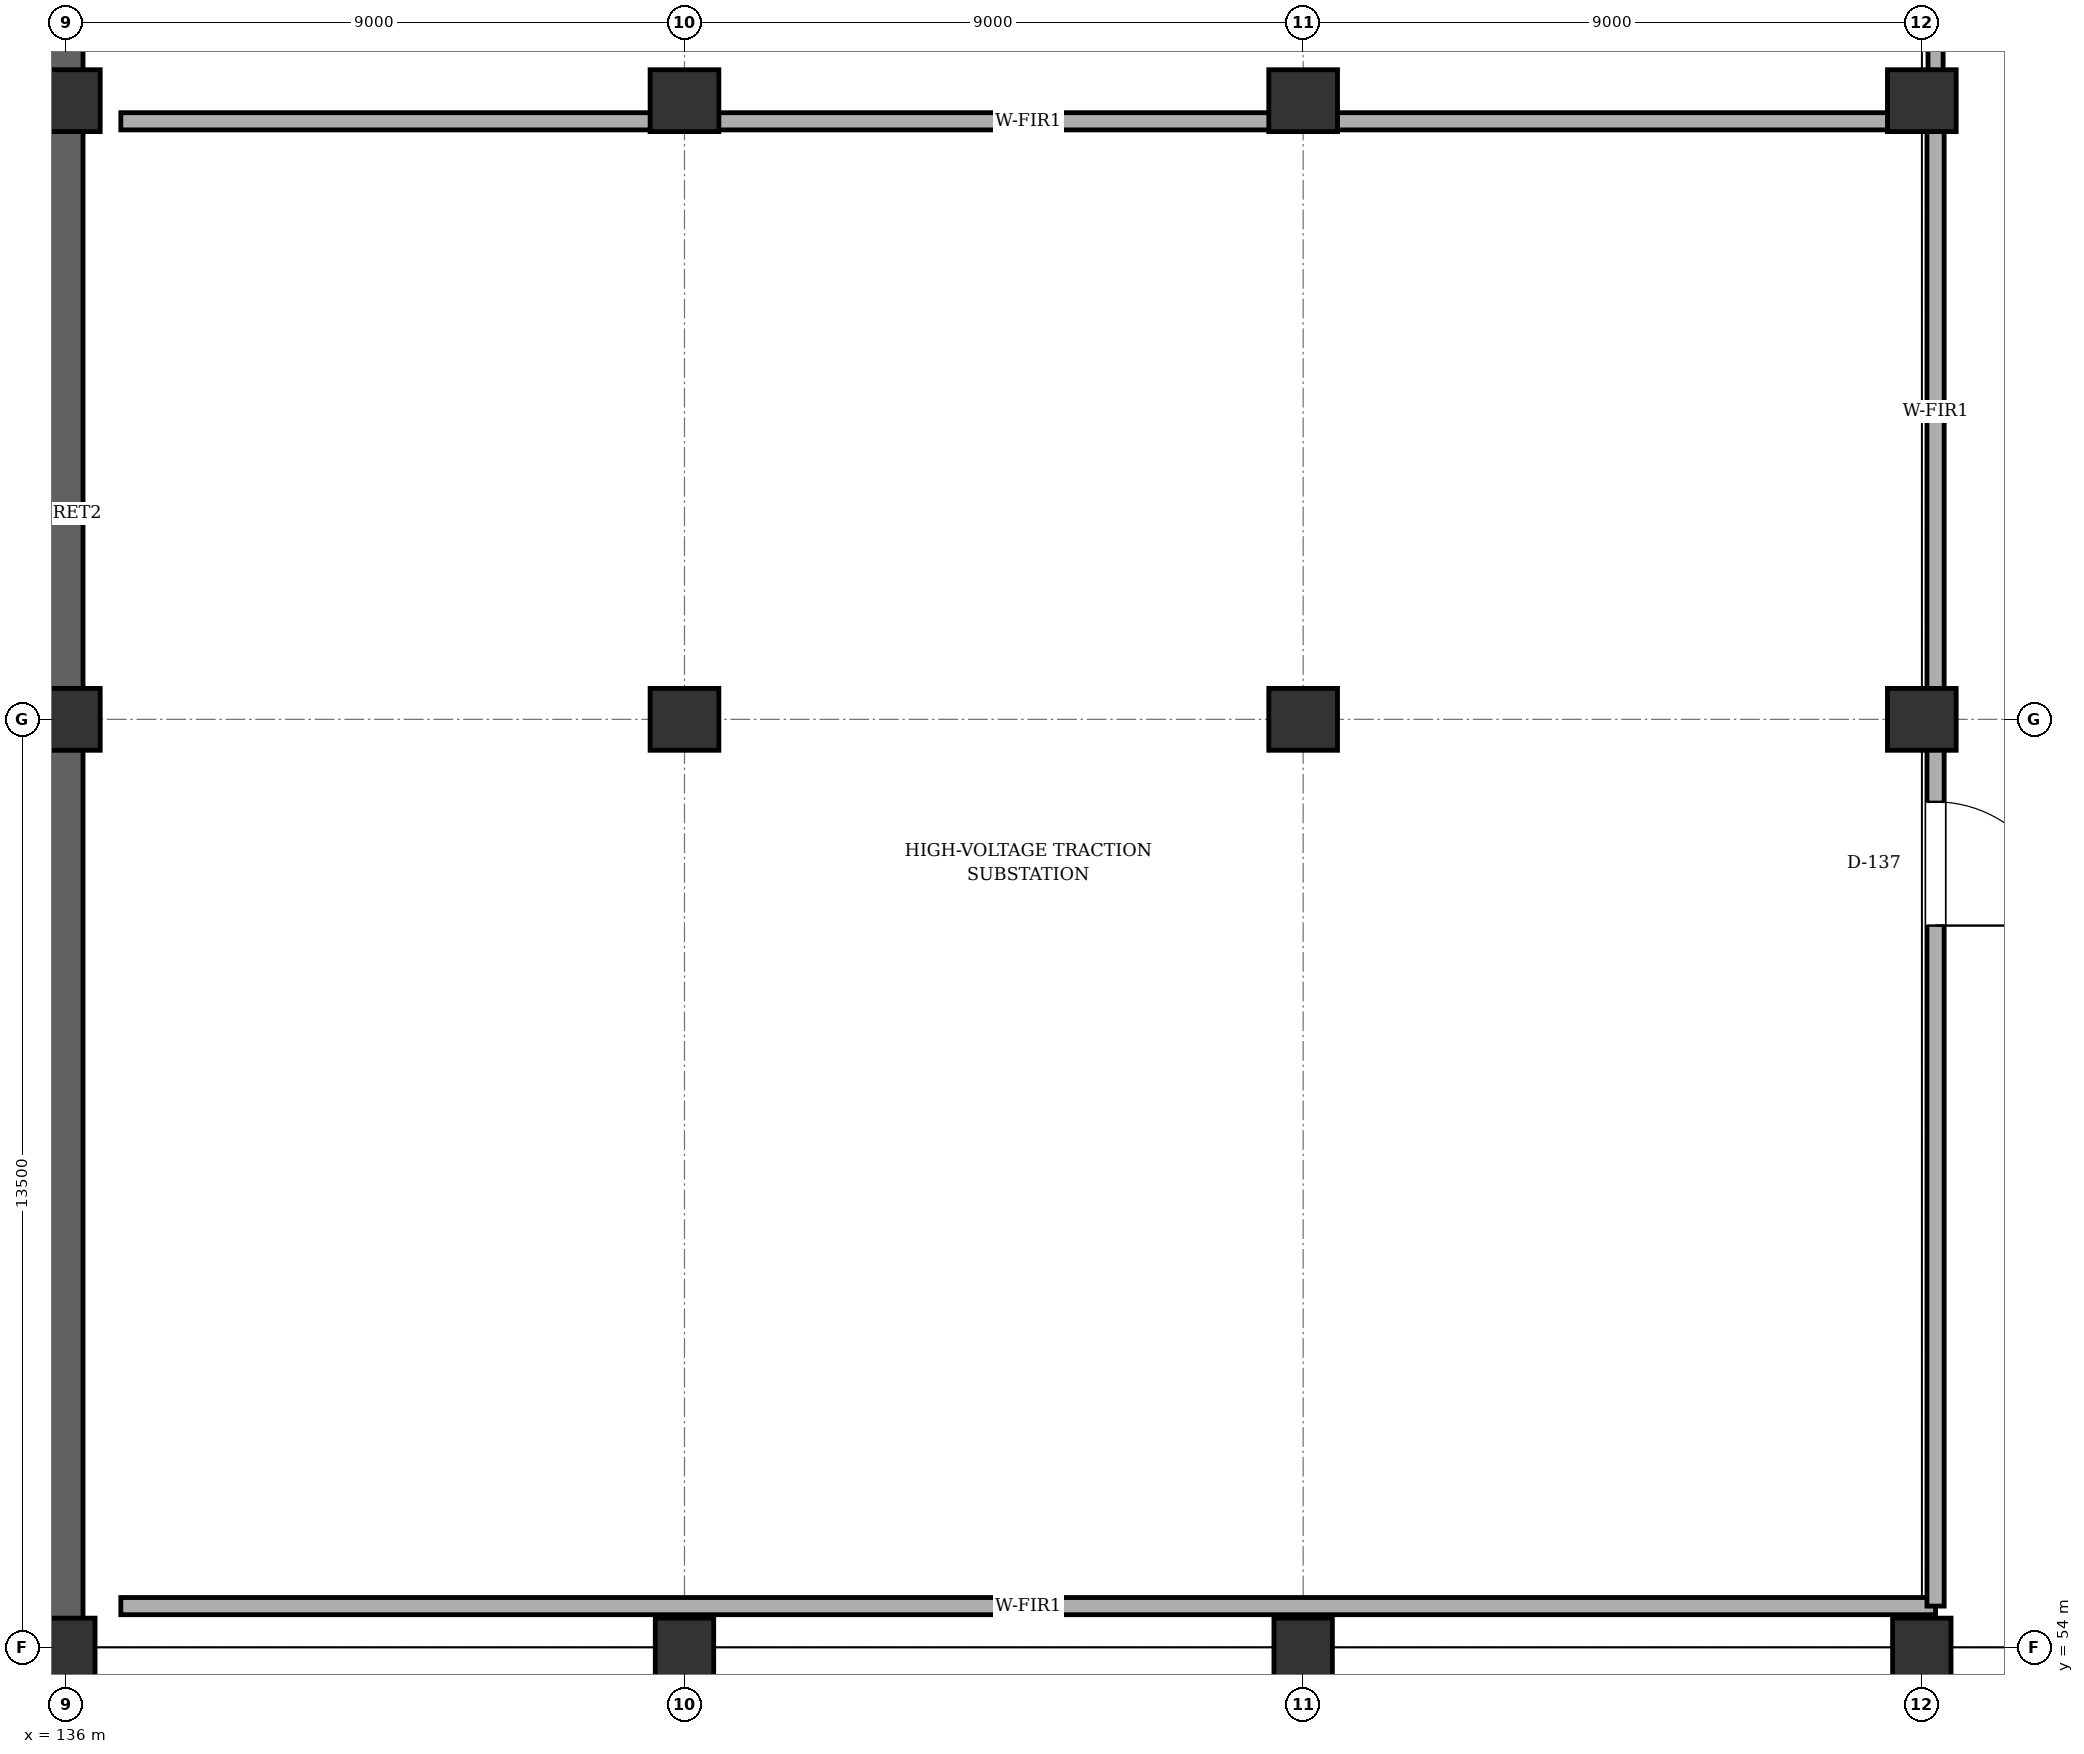
"""IFC4 building model, lengths in metres.
Left out: names, types, materials, properties, quantities, classifications, styles, units other than length and angle.
Written with IfcOpenShell. Run it as: python <this file> out.ifc"""

import sys

from ifc_helpers import new_model, si_unit, direction, frame, frame_2d, origin, origin_2d, place, context, subcontext, project, spatial, rectangle, extrude, element, fill, save


model = new_model("IFC4")
c1 = context("Model", 3, precision=1e-05, world=origin(), true_north=direction((0.0, 1.0)))
c2 = subcontext(c1, "Body", "Model", "MODEL_VIEW")
j1 = project(units=[si_unit("LENGTHUNIT", "METRE"), si_unit("PLANEANGLEUNIT", "RADIAN")], contexts=[c1])
p1 = place(None, origin())
s1 = spatial("IfcSite", under=j1, at=p1, CompositionType="ELEMENT")
p2 = place(p1, origin())
s2 = spatial("IfcBuilding", under=s1, at=p2, CompositionType="ELEMENT")
p3 = place(p2, frame((0.0, 0.0, -5.4)))
s3 = spatial("IfcBuildingStorey", under=s2, at=p3, CompositionType="ELEMENT", Elevation=-5.4)
p4 = place(p3, frame((136.0, 54.0, 0.0), z_axis=(0.0, 0.0, 1.0), x_axis=(1.0, 0.0, 0.0)))
e1 = element("IfcColumn", 1, at=p4, inside=s3, PredefinedType="COLUMN", context=c2, shape_type="SweptSolid", body=[
    extrude(rectangle(XDim=0.85, YDim=0.85, at=origin_2d()), origin(), (0.0, 0.0, 1.0), 5.4),
])
for number, where, z_axis, x_axis in (
    (2, (136.0, 67.5, 0.0), (0.0, 0.0, 1.0), (1.0, 0.0, 0.0)),
    (3, (136.0, 76.5, 0.0), (0.0, 0.0, 1.0), (1.0, 0.0, 0.0)),
):
    element("IfcColumn", number, at=place(p3, frame(where, z_axis=z_axis, x_axis=x_axis)), inside=s3, PredefinedType="COLUMN", context=c2, shape_type="SweptSolid", body=[
        extrude(rectangle(XDim=1.0, YDim=0.9, at=origin_2d()), origin(), (0.0, 0.0, 1.0), 5.4),
    ])
p5 = place(p3, frame((145.0, 54.0, 0.0), z_axis=(0.0, 0.0, 1.0), x_axis=(1.0, 0.0, 0.0)))
e4 = element("IfcColumn", 4, at=p5, inside=s3, PredefinedType="COLUMN", context=c2, shape_type="SweptSolid", body=[
    extrude(rectangle(XDim=0.85, YDim=0.85, at=origin_2d()), origin(), (0.0, 0.0, 1.0), 5.4),
])
for number, where, z_axis, x_axis in (
    (5, (145.0, 67.5, 0.0), (0.0, 0.0, 1.0), (1.0, 0.0, 0.0)),
    (6, (145.0, 76.5, 0.0), (0.0, 0.0, 1.0), (1.0, 0.0, 0.0)),
):
    element("IfcColumn", number, at=place(p3, frame(where, z_axis=z_axis, x_axis=x_axis)), inside=s3, PredefinedType="COLUMN", context=c2, shape_type="SweptSolid", body=[
        extrude(rectangle(XDim=1.0, YDim=0.9, at=origin_2d()), origin(), (0.0, 0.0, 1.0), 5.4),
    ])
p6 = place(p3, frame((154.0, 54.0, 0.0), z_axis=(0.0, 0.0, 1.0), x_axis=(1.0, 0.0, 0.0)))
e7 = element("IfcColumn", 7, at=p6, inside=s3, PredefinedType="COLUMN", context=c2, shape_type="SweptSolid", body=[
    extrude(rectangle(XDim=0.85, YDim=0.85, at=origin_2d()), origin(), (0.0, 0.0, 1.0), 5.4),
])
for number, where, z_axis, x_axis in (
    (8, (154.0, 67.5, 0.0), (0.0, 0.0, 1.0), (1.0, 0.0, 0.0)),
    (9, (154.0, 76.5, 0.0), (0.0, 0.0, 1.0), (1.0, 0.0, 0.0)),
):
    element("IfcColumn", number, at=place(p3, frame(where, z_axis=z_axis, x_axis=x_axis)), inside=s3, PredefinedType="COLUMN", context=c2, shape_type="SweptSolid", body=[
        extrude(rectangle(XDim=1.0, YDim=0.9, at=origin_2d()), origin(), (0.0, 0.0, 1.0), 5.4),
    ])
p7 = place(p3, frame((163.0, 54.0, 0.0), z_axis=(0.0, 0.0, 1.0), x_axis=(1.0, 0.0, 0.0)))
e10 = element("IfcColumn", 10, at=p7, inside=s3, PredefinedType="COLUMN", context=c2, shape_type="SweptSolid", body=[
    extrude(rectangle(XDim=0.85, YDim=0.85, at=origin_2d()), origin(), (0.0, 0.0, 1.0), 5.4),
])
for number, where, z_axis, x_axis in (
    (11, (163.0, 67.5, 0.0), (0.0, 0.0, 1.0), (1.0, 0.0, 0.0)),
    (12, (163.0, 76.5, 0.0), (0.0, 0.0, 1.0), (1.0, 0.0, 0.0)),
):
    element("IfcColumn", number, at=place(p3, frame(where, z_axis=z_axis, x_axis=x_axis)), inside=s3, PredefinedType="COLUMN", context=c2, shape_type="SweptSolid", body=[
        extrude(rectangle(XDim=1.0, YDim=0.9, at=origin_2d()), origin(), (0.0, 0.0, 1.0), 5.4),
    ])
p8 = place(p3, frame((136.0, 126.0, 0.0), z_axis=(0.0, 0.0, 1.0), x_axis=(0.0, -1.0, 0.0)))
e13 = element("IfcWall", 13, at=p8, inside=s3, PredefinedType="USERDEFINED", context=c2, shape_type="SweptSolid", body=[
    extrude(rectangle(XDim=72.0, YDim=0.5, at=frame_2d((36.0, 0.0))), origin(), (0.0, 0.0, 1.0), 5.1),
])
p9 = place(p3, frame((90.0, 54.0, 0.0), z_axis=(0.0, 0.0, 1.0), x_axis=(1.0, 0.0, 0.0)))
e14 = element("IfcWall", 14, at=p9, inside=s3, PredefinedType="USERDEFINED", context=c2, shape_type="SweptSolid", body=[
    extrude(rectangle(XDim=46.0, YDim=0.5, at=frame_2d((23.0, 0.0))), origin(), (0.0, 0.0, 1.0), 5.05),
])
for number, where, z_axis, x_axis in (
    (15, (163.2, 54.6, 0.0), (0.0, 0.0, 1.0), (-1.0, 0.0, 0.0)),
    (16, (136.8, 76.2, 0.0), (0.0, 0.0, 1.0), (1.0, 0.0, 0.0)),
):
    element("IfcWall", number, at=place(p3, frame(where, z_axis=z_axis, x_axis=x_axis)), inside=s3, PredefinedType="SOLIDWALL", context=c2, shape_type="SweptSolid", body=[
        extrude(rectangle(XDim=26.4, YDim=0.25, at=frame_2d((13.2, 0.0))), origin(), (0.0, 0.0, 1.0), 4.4),
    ])
p10 = place(p3, frame((163.2, 76.2, 0.0), z_axis=(0.0, 0.0, 1.0), x_axis=(0.0, -1.0, 0.0)))
e17 = element("IfcWall", 17, at=p10, inside=s3, PredefinedType="SOLIDWALL", context=c2, shape_type="SweptSolid", body=[
    extrude(rectangle(XDim=21.6, YDim=0.25, at=frame_2d((10.8, 0.0))), origin(), (0.0, 0.0, 1.0), 4.4),
])
p11 = place(p10, frame((9.9, 0.0, 0.0)))
e18 = element("IfcOpeningElement", 18, at=p11, cuts=e17, PredefinedType="OPENING", context=c2, shape_type="SweptSolid", body=[
    extrude(rectangle(XDim=1.8, YDim=2.2, at=frame_2d((0.9, 1.1))), frame((0.0, 0.135, 0.0), z_axis=(0.0, -1.0, 0.0), x_axis=(1.0, 0.0, 0.0)), (0.0, 0.0, 1.0), 0.27),
])
p12 = place(p3, frame((163.2, 103.0, 0.0), z_axis=(0.0, 0.0, 1.0), x_axis=(0.0, -1.0, 0.0)))
e19 = element("IfcWall", 19, at=p12, inside=s3, PredefinedType="SOLIDWALL", context=c2, shape_type="SweptSolid", body=[
    extrude(rectangle(XDim=26.2, YDim=0.22, at=frame_2d((13.1, 0.0))), origin(), (0.0, 0.0, 1.0), 4.4),
])
p13 = place(p12, frame((12.2, 0.0, 0.0)))
e20 = element("IfcOpeningElement", 20, at=p13, cuts=e19, PredefinedType="OPENING", context=c2, shape_type="SweptSolid", body=[
    extrude(rectangle(XDim=1.8, YDim=2.2, at=frame_2d((0.9, 1.1))), frame((0.0, 0.12, 0.0), z_axis=(0.0, -1.0, 0.0), x_axis=(1.0, 0.0, 0.0)), (0.0, 0.0, 1.0), 0.24),
])
p14 = place(p11, origin())
e21 = element("IfcDoor", 21, at=p14, inside=s3, OperationType="SINGLE_SWING_RIGHT", PredefinedType="DOOR", context=c2, shape_type="SweptSolid", body=[
    extrude(rectangle(XDim=1.8, YDim=2.2, at=frame_2d((0.9, 1.1))), frame((0.0, 0.025, 0.0), z_axis=(0.0, -1.0, 0.0), x_axis=(1.0, 0.0, 0.0)), (0.0, 0.0, 1.0), 0.05),
])
fill(e18, e21)
save(model, sys.argv[1])
